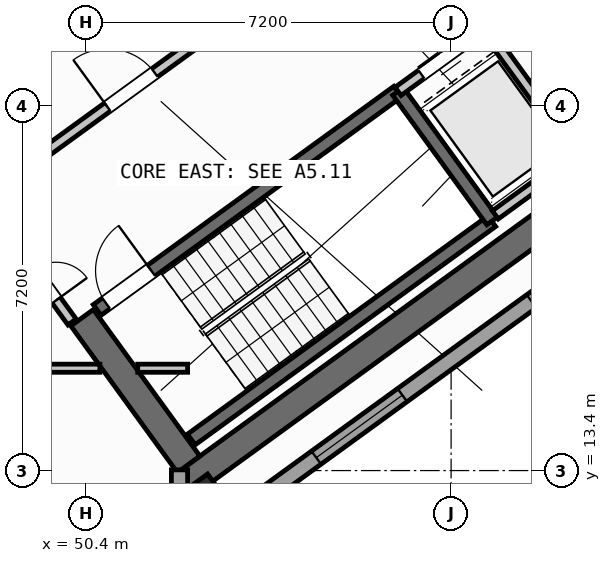
"""IFC4 building model, lengths in metres.
Left out: names, types, materials, properties, quantities, classifications, styles, units other than length and angle.
Written with IfcOpenShell. Run it as: python <this file> out.ifc"""

import sys

from ifc_helpers import new_model, si_unit, direction, frame, frame_2d, origin, origin_2d, place, context, subcontext, project, spatial, rectangle, hollow_rectangle, extrude, source, transform, mapped, element, fill, save


model = new_model("IFC4")
c1 = context("Model", 3, precision=1e-05, world=origin(), true_north=direction((0.0, 1.0)))
c2 = subcontext(c1, "Body", "Model", "MODEL_VIEW")
j1 = project(units=[si_unit("LENGTHUNIT", "METRE"), si_unit("PLANEANGLEUNIT", "RADIAN")], contexts=[c1])
p1 = place(None, origin())
s1 = spatial("IfcSite", under=j1, at=p1, CompositionType="ELEMENT")
p2 = place(p1, origin())
s2 = spatial("IfcBuilding", under=s1, at=p2, CompositionType="ELEMENT")
p3 = place(p2, frame((0.0, 0.0, 184.2)))
s3 = spatial("IfcBuildingStorey", under=s2, at=p3, CompositionType="ELEMENT", Elevation=184.2)
p4 = place(p3, frame((52.359, 13.14, 0.0), z_axis=(0.0, 0.0, 1.0), x_axis=(0.809014896919, 0.587788139183, 0.0)))
e1 = element("IfcWall", 1, at=p4, inside=s3, PredefinedType="SHEAR", context=c2, shape_type="SweptSolid", body=[
    extrude(rectangle(XDim=12.34, YDim=0.55, at=frame_2d((6.17, 0.0))), origin(), (0.0, 0.0, 1.0), 3.35),
])
p5 = place(p3, frame((52.42, 13.524, 0.0), z_axis=(0.0, 0.0, 1.0), x_axis=(-0.587802113096, 0.809004744015, 0.0)))
e2 = element("IfcWall", 2, at=p5, inside=s3, PredefinedType="SHEAR", context=c2, shape_type="SweptSolid", body=[
    extrude(rectangle(XDim=3.575, YDim=0.55, at=frame_2d((1.788, 0.0))), origin(), (0.0, 0.0, 1.0), 3.35),
])
m1 = source(origin(), c2, "Body", "SweptSolid", [
    extrude(hollow_rectangle(XDim=0.8, YDim=0.8, WallThickness=0.032, at=origin_2d()), origin(), (0.0, 0.0, 1.0), 3.6),
])
p6 = place(p3, frame((52.705, 12.773, 0.0), z_axis=(0.0, 0.0, 1.0), x_axis=(0.809016994375, 0.587785252292, 0.0)))
e3 = element("IfcColumn", 3, at=p6, inside=s3, PredefinedType="COLUMN", context=c2, shape_type="MappedRepresentation", body=[
    mapped(m1, transform((0.0, 0.0, 0.0), scale=1.0)),
])
p7 = place(p3, frame((67.454, 22.747, 0.0), z_axis=(0.0, 0.0, 1.0), x_axis=(-0.809021120468, -0.587779573171, 0.0)))
e4 = element("IfcWall", 4, at=p7, inside=s3, PredefinedType="STANDARD", context=c2, shape_type="SweptSolid", body=[
    extrude(rectangle(XDim=17.588, YDim=0.32, at=frame_2d((8.794, 0.0))), origin(), (0.0, 0.0, 1.0), 3.35),
])
p8 = place(p7, frame((1.624, 0.0, 0.0)))
e5 = element("IfcOpeningElement", 5, at=p8, cuts=e4, PredefinedType="OPENING", context=c2, shape_type="SweptSolid", body=[
    extrude(rectangle(XDim=1.05, YDim=2.15, at=frame_2d((0.525, 1.075))), frame((0.0, 0.17, 0.0), z_axis=(0.0, -1.0, 0.0), x_axis=(1.0, 0.0, 0.0)), (0.0, 0.0, 1.0), 0.34),
])
p9 = place(p7, frame((8.119, 0.0, 0.8)))
e6 = element("IfcOpeningElement", 6, at=p9, cuts=e4, PredefinedType="OPENING", context=c2, shape_type="SweptSolid", body=[
    extrude(rectangle(XDim=2.1, YDim=1.55, at=frame_2d((1.05, 0.775))), frame((0.0, 0.17, 0.0), z_axis=(0.0, -1.0, 0.0), x_axis=(1.0, 0.0, 0.0)), (0.0, 0.0, 1.0), 0.34),
])
p10 = place(p7, frame((13.369, 0.0, 0.8)))
e7 = element("IfcOpeningElement", 7, at=p10, cuts=e4, PredefinedType="OPENING", context=c2, shape_type="SweptSolid", body=[
    extrude(rectangle(XDim=2.1, YDim=1.55, at=frame_2d((1.05, 0.775))), frame((0.0, 0.17, 0.0), z_axis=(0.0, -1.0, 0.0), x_axis=(1.0, 0.0, 0.0)), (0.0, 0.0, 1.0), 0.34),
])
p11 = place(p3, frame((52.24, 13.414, 0.0), z_axis=(0.0, 0.0, 1.0), x_axis=(0.0, -1.0, 0.0)))
e8 = element("IfcWall", 8, at=p11, inside=s3, PredefinedType="STANDARD", context=c2, shape_type="SweptSolid", body=[
    extrude(rectangle(XDim=9.948, YDim=0.32, at=frame_2d((4.974, 0.0))), origin(), (0.0, 0.0, 1.0), 3.35),
])
p12 = place(p11, frame((2.296, 0.0, 0.8)))
e9 = element("IfcOpeningElement", 9, at=p12, cuts=e8, PredefinedType="OPENING", context=c2, shape_type="SweptSolid", body=[
    extrude(rectangle(XDim=2.1, YDim=1.55, at=frame_2d((1.05, 0.775))), frame((0.0, 0.17, 0.0), z_axis=(0.0, -1.0, 0.0), x_axis=(1.0, 0.0, 0.0)), (0.0, 0.0, 1.0), 0.34),
])
p13 = place(p11, frame((7.033, 0.0, 0.85)))
e10 = element("IfcOpeningElement", 10, at=p13, cuts=e8, PredefinedType="OPENING", context=c2, shape_type="SweptSolid", body=[
    extrude(rectangle(XDim=1.8, YDim=1.5, at=frame_2d((0.9, 0.75))), frame((0.0, 0.17, 0.0), z_axis=(0.0, -1.0, 0.0), x_axis=(1.0, 0.0, 0.0)), (0.0, 0.0, 1.0), 0.34),
])
p14 = place(p3, frame((52.472, 14.013, 0.0), z_axis=(0.0, 0.0, 1.0), x_axis=(0.809028366311, 0.587769599847, 0.0)))
e11 = element("IfcWall", 11, at=p14, inside=s3, PredefinedType="SHEAR", context=c2, shape_type="SweptSolid", body=[
    extrude(rectangle(XDim=7.33, YDim=0.26, at=frame_2d((3.665, 0.0))), origin(), (0.0, 0.0, 1.0), 3.35),
])
p15 = place(p3, frame((50.615, 16.57, 0.0), z_axis=(0.0, 0.0, 1.0), x_axis=(0.809028366311, 0.587769599847, 0.0)))
e12 = element("IfcWall", 12, at=p15, inside=s3, PredefinedType="SHEAR", context=c2, shape_type="SweptSolid", body=[
    extrude(rectangle(XDim=7.33, YDim=0.26, at=frame_2d((3.665, 0.0))), origin(), (0.0, 0.0, 1.0), 3.35),
])
p16 = place(p15, frame((0.22, 0.0, 0.0)))
e13 = element("IfcOpeningElement", 13, at=p16, cuts=e12, PredefinedType="OPENING", context=c2, shape_type="SweptSolid", body=[
    extrude(rectangle(XDim=1.1, YDim=2.1, at=frame_2d((0.55, 1.05))), frame((0.0, 0.14, 0.0), z_axis=(0.0, -1.0, 0.0), x_axis=(1.0, 0.0, 0.0)), (0.0, 0.0, 1.0), 0.28),
])
p17 = place(p3, frame((58.41, 18.327, 0.0), z_axis=(0.0, 0.0, 1.0), x_axis=(-0.58776738483, 0.809029975545, 0.0)))
e14 = element("IfcWall", 14, at=p17, inside=s3, PredefinedType="SHEAR", context=c2, shape_type="SweptSolid", body=[
    extrude(rectangle(XDim=3.16, YDim=0.26, at=frame_2d((1.58, 0.0))), origin(), (0.0, 0.0, 1.0), 3.35),
])
p18 = place(p3, frame((47.065, 21.407, 0.0), z_axis=(0.0, 0.0, 1.0), x_axis=(0.809032984992, 0.587763242466, 0.0)))
e15 = element("IfcWall", 15, at=p18, inside=s3, PredefinedType="STANDARD", context=c2, shape_type="SweptSolid", body=[
    extrude(rectangle(XDim=3.448, YDim=0.2, at=frame_2d((1.724, 0.0))), origin(), (0.0, 0.0, 1.0), 3.34),
])
p19 = place(p18, frame((0.458, 0.0, 0.0)))
e16 = element("IfcOpeningElement", 16, at=p19, cuts=e15, PredefinedType="OPENING", context=c2, shape_type="SweptSolid", body=[
    extrude(rectangle(XDim=1.3, YDim=2.2, at=frame_2d((0.65, 1.1))), frame((0.0, 0.11, 0.0), z_axis=(0.0, -1.0, 0.0), x_axis=(1.0, 0.0, 0.0)), (0.0, 0.0, 1.0), 0.22),
])
p20 = place(p3, frame((48.758, 19.077, 0.0), z_axis=(0.0, 0.0, 1.0), x_axis=(0.809005065155, 0.587801671104, 0.0)))
e17 = element("IfcWall", 17, at=p20, inside=s3, PredefinedType="STANDARD", context=c2, shape_type="SweptSolid", body=[
    extrude(rectangle(XDim=5.768, YDim=0.2, at=frame_2d((2.884, 0.0))), origin(), (0.0, 0.0, 1.0), 3.34),
])
p21 = place(p20, frame((2.548, 0.0, 0.0)))
e18 = element("IfcOpeningElement", 18, at=p21, cuts=e17, PredefinedType="OPENING", context=c2, shape_type="SweptSolid", body=[
    extrude(rectangle(XDim=1.15, YDim=2.1, at=frame_2d((0.575, 1.05))), frame((0.0, 0.11, 0.0), z_axis=(0.0, -1.0, 0.0), x_axis=(1.0, 0.0, 0.0)), (0.0, 0.0, 1.0), 0.22),
])
p22 = place(p3, frame((56.553, 20.884, 0.0), z_axis=(0.0, 0.0, 1.0), x_axis=(0.809023564264, 0.58777620951, 0.0)))
e19 = element("IfcWall", 19, at=p22, inside=s3, PredefinedType="STANDARD", context=c2, shape_type="SweptSolid", body=[
    extrude(rectangle(XDim=3.818, YDim=0.2, at=frame_2d((1.909, 0.0))), origin(), (0.0, 0.0, 1.0), 3.34),
])
p23 = place(p22, frame((0.57, 0.0, 0.0)))
e20 = element("IfcOpeningElement", 20, at=p23, cuts=e19, PredefinedType="OPENING", context=c2, shape_type="SweptSolid", body=[
    extrude(rectangle(XDim=1.1, YDim=2.15, at=frame_2d((0.55, 1.075))), frame((0.0, 0.11, 0.0), z_axis=(0.0, -1.0, 0.0), x_axis=(1.0, 0.0, 0.0)), (0.0, 0.0, 1.0), 0.22),
])
p24 = place(p22, frame((2.65, 0.0, 0.0)))
e21 = element("IfcOpeningElement", 21, at=p24, cuts=e19, PredefinedType="OPENING", context=c2, shape_type="SweptSolid", body=[
    extrude(rectangle(XDim=0.86, YDim=2.05, at=frame_2d((0.43, 1.025))), frame((0.0, 0.11, 0.0), z_axis=(0.0, -1.0, 0.0), x_axis=(1.0, 0.0, 0.0)), (0.0, 0.0, 1.0), 0.22),
])
p25 = place(p3, frame((60.067, 19.655, 0.0), z_axis=(0.0, 0.0, 1.0), x_axis=(-0.587800520745, 0.809005900975, 0.0)))
e22 = element("IfcWall", 22, at=p25, inside=s3, PredefinedType="STANDARD", context=c2, shape_type="SweptSolid", body=[
    extrude(rectangle(XDim=2.66, YDim=0.2, at=frame_2d((1.33, 0.0))), origin(), (0.0, 0.0, 1.0), 3.34),
])
p26 = place(p3, frame((58.472, 18.447, 0.0), z_axis=(0.0, 0.0, 1.0), x_axis=(0.809018631237, 0.587782999339, 0.0)))
e23 = element("IfcWall", 23, at=p26, inside=s3, PredefinedType="STANDARD", context=c2, shape_type="SweptSolid", body=[
    extrude(rectangle(XDim=3.698, YDim=0.2, at=frame_2d((1.849, 0.0))), origin(), (0.0, 0.0, 1.0), 3.34),
])
p27 = place(p3, frame((35.237, 15.42, 0.0), z_axis=(0.0, 0.0, 1.0), x_axis=(1.0, 0.0, 0.0)))
e24 = element("IfcWall", 24, at=p27, inside=s3, PredefinedType="PARTITIONING", context=c2, shape_type="SweptSolid", body=[
    extrude(rectangle(XDim=15.432, YDim=0.16, at=frame_2d((7.716, 0.0))), origin(), (0.0, 0.0, 1.0), 3.34),
])
p28 = place(p27, frame((0.969, 0.0, 0.0)))
e25 = element("IfcOpeningElement", 25, at=p28, cuts=e24, PredefinedType="OPENING", context=c2, shape_type="SweptSolid", body=[
    extrude(rectangle(XDim=1.0, YDim=2.1, at=frame_2d((0.5, 1.05))), frame((0.0, 0.09, 0.0), z_axis=(0.0, -1.0, 0.0), x_axis=(1.0, 0.0, 0.0)), (0.0, 0.0, 1.0), 0.18),
])
p29 = place(p27, frame((8.799, 0.0, 0.0)))
e26 = element("IfcOpeningElement", 26, at=p29, cuts=e24, PredefinedType="OPENING", context=c2, shape_type="SweptSolid", body=[
    extrude(rectangle(XDim=1.0, YDim=2.1, at=frame_2d((0.5, 1.05))), frame((0.0, 0.09, 0.0), z_axis=(0.0, -1.0, 0.0), x_axis=(1.0, 0.0, 0.0)), (0.0, 0.0, 1.0), 0.18),
])
p30 = place(p3, frame((51.416, 15.42, 0.0), z_axis=(0.0, 0.0, 1.0), x_axis=(1.0, 0.0, 0.0)))
e27 = element("IfcWall", 27, at=p30, inside=s3, PredefinedType="PARTITIONING", context=c2, shape_type="SweptSolid", body=[
    extrude(rectangle(XDim=0.984, YDim=0.16, at=frame_2d((0.492, 0.0))), origin(), (0.0, 0.0, 1.0), 3.34),
])
p31 = place(p3, frame((50.119, 16.333, 0.0), z_axis=(0.0, 0.0, 1.0), x_axis=(-0.587749856981, 0.809042709391, 0.0)))
e28 = element("IfcWall", 28, at=p31, inside=s3, PredefinedType="STANDARD", context=c2, shape_type="SweptSolid", body=[
    extrude(rectangle(XDim=2.96, YDim=0.2, at=frame_2d((1.48, 0.0))), origin(), (0.0, 0.0, 1.0), 3.34),
])
p32 = place(p31, frame((0.53, 0.0, 0.0)))
e29 = element("IfcOpeningElement", 29, at=p32, cuts=e28, PredefinedType="OPENING", context=c2, shape_type="SweptSolid", body=[
    extrude(rectangle(XDim=1.5, YDim=2.15, at=frame_2d((0.75, 1.075))), frame((0.0, 0.11, 0.0), z_axis=(0.0, -1.0, 0.0), x_axis=(1.0, 0.0, 0.0)), (0.0, 0.0, 1.0), 0.22),
])
m2 = source(origin(), c2, "Body", "SweptSolid", [
    extrude(rectangle(XDim=2.1, YDim=1.55, at=frame_2d((1.05, 0.775))), frame((0.0, 0.03, 0.0), z_axis=(0.0, -1.0, 0.0), x_axis=(1.0, 0.0, 0.0)), (0.0, 0.0, 1.0), 0.06),
])
p33 = place(p9, origin())
e30 = element("IfcWindow", 30, at=p33, inside=s3, PartitioningType="SINGLE_PANEL", PredefinedType="WINDOW", context=c2, shape_type="MappedRepresentation", body=[
    mapped(m2, transform((0.0, 0.0, 0.0), scale=1.0)),
])
fill(e6, e30)
p34 = place(p10, origin())
e31 = element("IfcWindow", 31, at=p34, inside=s3, PartitioningType="SINGLE_PANEL", PredefinedType="WINDOW", context=c2, shape_type="MappedRepresentation", body=[
    mapped(m2, transform((0.0, 0.0, 0.0), scale=1.0)),
])
fill(e7, e31)
m3 = source(origin(), c2, "Body", "SweptSolid", [
    extrude(rectangle(XDim=1.1, YDim=2.1, at=frame_2d((0.55, 1.05))), frame((0.0, 0.025, 0.0), z_axis=(0.0, -1.0, 0.0), x_axis=(1.0, 0.0, 0.0)), (0.0, 0.0, 1.0), 0.05),
])
p35 = place(p16, origin())
e32 = element("IfcDoor", 32, at=p35, inside=s3, OperationType="SINGLE_SWING_RIGHT", PredefinedType="DOOR", context=c2, shape_type="MappedRepresentation", body=[
    mapped(m3, transform((0.0, 0.0, 0.0), scale=1.0)),
])
fill(e13, e32)
m4 = source(origin(), c2, "Body", "SweptSolid", [
    extrude(rectangle(XDim=1.15, YDim=2.1, at=frame_2d((0.575, 1.05))), frame((0.0, 0.025, 0.0), z_axis=(0.0, -1.0, 0.0), x_axis=(1.0, 0.0, 0.0)), (0.0, 0.0, 1.0), 0.05),
])
p36 = place(p21, origin())
e33 = element("IfcDoor", 33, at=p36, inside=s3, OperationType="SINGLE_SWING_LEFT", PredefinedType="DOOR", context=c2, shape_type="MappedRepresentation", body=[
    mapped(m4, transform((0.0, 0.0, 0.0), scale=1.0)),
])
fill(e18, e33)
m5 = source(origin(), c2, "Body", "SweptSolid", [
    extrude(rectangle(XDim=1.1, YDim=2.15, at=frame_2d((0.55, 1.075))), frame((0.0, 0.025, 0.0), z_axis=(0.0, -1.0, 0.0), x_axis=(1.0, 0.0, 0.0)), (0.0, 0.0, 1.0), 0.05),
])
p37 = place(p23, origin())
e34 = element("IfcDoor", 34, at=p37, inside=s3, OperationType="DOUBLE_DOOR_SLIDING", PredefinedType="DOOR", context=c2, shape_type="MappedRepresentation", body=[
    mapped(m5, transform((0.0, 0.0, 0.0), scale=1.0)),
])
fill(e20, e34)
m6 = source(origin(), c2, "Body", "SweptSolid", [
    extrude(rectangle(XDim=1.5, YDim=2.15, at=frame_2d((0.75, 1.075))), frame((0.0, 0.025, 0.0), z_axis=(0.0, -1.0, 0.0), x_axis=(1.0, 0.0, 0.0)), (0.0, 0.0, 1.0), 0.05),
])
p38 = place(p32, frame((1.5, 0.0, 0.0), z_axis=(0.0, 0.0, 1.0), x_axis=(-1.0, 0.0, 0.0)))
e35 = element("IfcDoor", 35, at=p38, inside=s3, OperationType="DOUBLE_DOOR_SINGLE_SWING", PredefinedType="DOOR", context=c2, shape_type="MappedRepresentation", body=[
    mapped(m6, transform((0.0, 0.0, 0.0), scale=1.0)),
])
fill(e29, e35)
save(model, sys.argv[1])
